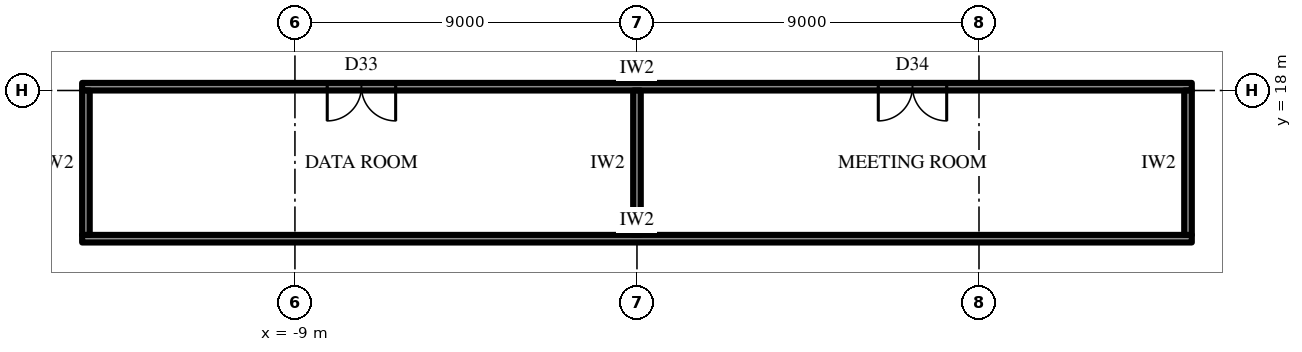
"""IFC4 building model, lengths in metres.
Left out: names, types, materials, properties, quantities, classifications, styles, units other than length and angle.
Written with IfcOpenShell. Run it as: python <this file> out.ifc"""

import sys

from ifc_helpers import new_model, si_unit, direction, frame, frame_2d, origin, place, context, subcontext, project, spatial, rectangle, extrude, element, fill, save


model = new_model("IFC4")
c1 = context("Model", 3, precision=1e-05, world=origin(), true_north=direction((0.0, 1.0)))
c2 = subcontext(c1, "Body", "Model", "MODEL_VIEW")
j1 = project(units=[si_unit("LENGTHUNIT", "METRE"), si_unit("PLANEANGLEUNIT", "RADIAN")], contexts=[c1])
p1 = place(None, origin())
s1 = spatial("IfcSite", under=j1, at=p1, CompositionType="ELEMENT")
p2 = place(p1, origin())
s2 = spatial("IfcBuilding", under=s1, at=p2, CompositionType="ELEMENT")
p3 = place(p2, frame((0.0, 0.0, 270.1)))
s3 = spatial("IfcBuildingStorey", under=s2, at=p3, CompositionType="ELEMENT", Elevation=270.1)
p4 = place(p3, frame((-14.6, 14.1, 0.0), z_axis=(0.0, 0.0, 1.0), x_axis=(1.0, 0.0, 0.0)))
e1 = element("IfcWall", 1, at=p4, inside=s3, PredefinedType="PARTITIONING", context=c2, shape_type="SweptSolid", body=[
    extrude(rectangle(XDim=29.2, YDim=0.2, at=frame_2d((14.6, 0.0))), origin(), (0.0, 0.0, 1.0), 4.0),
])
p5 = place(p3, frame((-14.6, 18.1, 0.0), z_axis=(0.0, 0.0, 1.0), x_axis=(1.0, 0.0, 0.0)))
e2 = element("IfcWall", 2, at=p5, inside=s3, PredefinedType="PARTITIONING", context=c2, shape_type="SweptSolid", body=[
    extrude(rectangle(XDim=29.2, YDim=0.2, at=frame_2d((14.6, 0.0))), origin(), (0.0, 0.0, 1.0), 4.0),
])
p6 = place(p5, frame((6.45, 0.0, 0.0)))
e3 = element("IfcOpeningElement", 3, at=p6, cuts=e2, PredefinedType="OPENING", context=c2, shape_type="SweptSolid", body=[
    extrude(rectangle(XDim=1.8, YDim=2.4, at=frame_2d((0.9, 1.2))), frame((0.0, 0.11, 0.0), z_axis=(0.0, -1.0, 0.0), x_axis=(1.0, 0.0, 0.0)), (0.0, 0.0, 1.0), 0.22),
])
p7 = place(p5, frame((20.95, 0.0, 0.0)))
e4 = element("IfcOpeningElement", 4, at=p7, cuts=e2, PredefinedType="OPENING", context=c2, shape_type="SweptSolid", body=[
    extrude(rectangle(XDim=1.8, YDim=2.4, at=frame_2d((0.9, 1.2))), frame((0.0, 0.11, 0.0), z_axis=(0.0, -1.0, 0.0), x_axis=(1.0, 0.0, 0.0)), (0.0, 0.0, 1.0), 0.22),
])
p8 = place(p3, frame((-14.5, 14.2, 0.0), z_axis=(0.0, 0.0, 1.0), x_axis=(0.0, 1.0, 0.0)))
e5 = element("IfcWall", 5, at=p8, inside=s3, PredefinedType="PARTITIONING", context=c2, shape_type="SweptSolid", body=[
    extrude(rectangle(XDim=3.8, YDim=0.2, at=frame_2d((1.9, 0.0))), origin(), (0.0, 0.0, 1.0), 4.0),
])
p9 = place(p3, frame((0.0, 14.2, 0.0), z_axis=(0.0, 0.0, 1.0), x_axis=(0.0, 1.0, 0.0)))
e6 = element("IfcWall", 6, at=p9, inside=s3, PredefinedType="PARTITIONING", context=c2, shape_type="SweptSolid", body=[
    extrude(rectangle(XDim=3.8, YDim=0.2, at=frame_2d((1.9, 0.0))), origin(), (0.0, 0.0, 1.0), 2.992),
])
p10 = place(p3, frame((14.5, 14.2, 0.0), z_axis=(0.0, 0.0, 1.0), x_axis=(0.0, 1.0, 0.0)))
e7 = element("IfcWall", 7, at=p10, inside=s3, PredefinedType="PARTITIONING", context=c2, shape_type="SweptSolid", body=[
    extrude(rectangle(XDim=3.8, YDim=0.2, at=frame_2d((1.9, 0.0))), origin(), (0.0, 0.0, 1.0), 4.0),
])
p11 = place(p6, frame((1.8, 0.0, 0.0), z_axis=(0.0, 0.0, 1.0), x_axis=(-1.0, 0.0, 0.0)))
e8 = element("IfcDoor", 8, at=p11, inside=s3, OperationType="DOUBLE_DOOR_SINGLE_SWING", PredefinedType="DOOR", context=c2, shape_type="SweptSolid", body=[
    extrude(rectangle(XDim=1.8, YDim=2.4, at=frame_2d((0.9, 1.2))), frame((0.0, 0.025, 0.0), z_axis=(0.0, -1.0, 0.0), x_axis=(1.0, 0.0, 0.0)), (0.0, 0.0, 1.0), 0.05),
])
fill(e3, e8)
p12 = place(p7, frame((1.8, 0.0, 0.0), z_axis=(0.0, 0.0, 1.0), x_axis=(-1.0, 0.0, 0.0)))
e9 = element("IfcDoor", 9, at=p12, inside=s3, OperationType="DOUBLE_DOOR_SINGLE_SWING", PredefinedType="DOOR", context=c2, shape_type="SweptSolid", body=[
    extrude(rectangle(XDim=1.8, YDim=2.4, at=frame_2d((0.9, 1.2))), frame((0.0, 0.025, 0.0), z_axis=(0.0, -1.0, 0.0), x_axis=(1.0, 0.0, 0.0)), (0.0, 0.0, 1.0), 0.05),
])
fill(e4, e9)
save(model, sys.argv[1])
